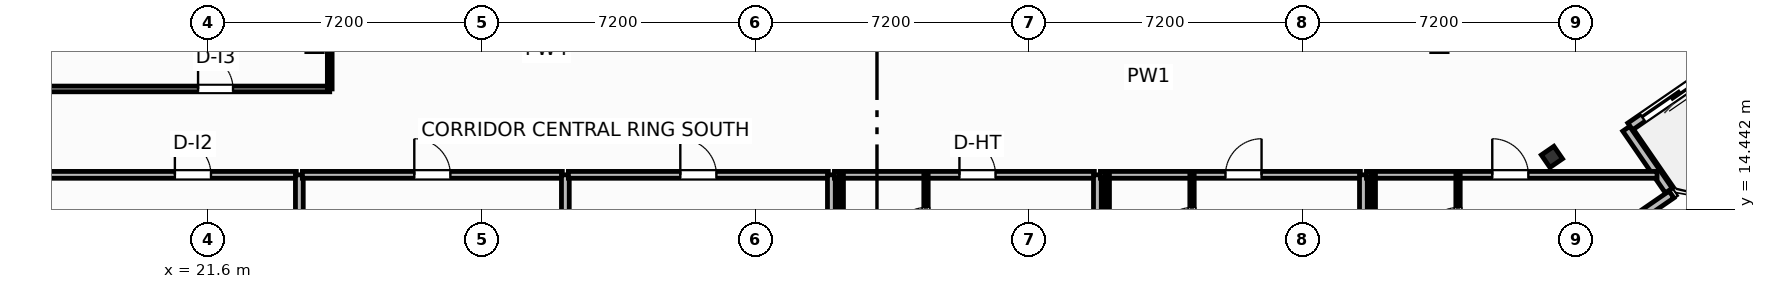
"""IFC4 building model, lengths in metres.
Left out: names, types, materials, properties, quantities, classifications, styles, units other than length and angle.
Written with IfcOpenShell. Run it as: python <this file> out.ifc"""

import sys

from ifc_helpers import new_model, si_unit, direction, frame, frame_2d, origin, origin_2d, place, context, subcontext, project, spatial, rectangle, i_section, extrude, element, fill, save


model = new_model("IFC4")
c1 = context("Model", 3, precision=1e-05, world=origin(), true_north=direction((0.0, 1.0)))
c2 = subcontext(c1, "Body", "Model", "MODEL_VIEW")
j1 = project(units=[si_unit("LENGTHUNIT", "METRE"), si_unit("PLANEANGLEUNIT", "RADIAN")], contexts=[c1])
p1 = place(None, origin())
s1 = spatial("IfcSite", under=j1, at=p1, CompositionType="ELEMENT")
p2 = place(p1, origin())
s2 = spatial("IfcBuilding", under=s1, at=p2, CompositionType="ELEMENT")
p3 = place(p2, frame((0.0, 0.0, 258.2)))
s3 = spatial("IfcBuildingStorey", under=s2, at=p3, CompositionType="ELEMENT", Elevation=258.2)
p4 = place(p3, frame((56.96, 15.823, 0.0), z_axis=(0.0, 0.0, 1.0), x_axis=(0.823532597628, 0.567268949127, 0.0)))
e1 = element("IfcColumn", 1, at=p4, inside=s3, PredefinedType="COLUMN", context=c2, shape_type="SweptSolid", body=[
    extrude(i_section(OverallWidth=0.401, OverallDepth=0.399, WebThickness=0.025, FlangeThickness=0.04, FilletRadius=0.022, at=origin_2d()), origin(), (0.0, 0.0, 1.0), 3.7),
])
p5 = place(p3, frame((63.605, 19.78, 0.0), z_axis=(0.0, 0.0, 1.0), x_axis=(-0.823541290762, -0.567256328665, 0.0)))
e2 = element("IfcWall", 2, at=p5, inside=s3, PredefinedType="SOLIDWALL", context=c2, shape_type="SweptSolid", body=[
    extrude(rectangle(XDim=5.567, YDim=0.22, at=frame_2d((2.784, 0.0))), origin(), (0.0, 0.0, 1.0), 2.73),
])
p6 = place(p5, frame((3.067, 0.0, 0.0)))
e3 = element("IfcOpeningElement", 3, at=p6, cuts=e2, PredefinedType="OPENING", context=c2, shape_type="SweptSolid", body=[
    extrude(rectangle(XDim=2.1, YDim=2.3, at=frame_2d((1.05, 1.15))), frame((0.0, 0.12, 0.0), z_axis=(0.0, -1.0, 0.0), x_axis=(1.0, 0.0, 0.0)), (0.0, 0.0, 1.0), 0.24),
])
p7 = place(p3, frame((53.49, 10.275, 0.0), z_axis=(0.0, 0.0, 1.0), x_axis=(0.823530942962, 0.56727135128, 0.0)))
e4 = element("IfcWall", 4, at=p7, inside=s3, PredefinedType="SOLIDWALL", context=c2, shape_type="SweptSolid", body=[
    extrude(rectangle(XDim=8.035, YDim=0.22, at=frame_2d((4.018, 0.0))), origin(), (0.0, 0.0, 1.0), 2.73),
])
p8 = place(p7, frame((2.968, 0.0, 0.8)))
e5 = element("IfcOpeningElement", 5, at=p8, cuts=e4, PredefinedType="OPENING", context=c2, shape_type="SweptSolid", body=[
    extrude(rectangle(XDim=2.1, YDim=1.75, at=frame_2d((1.05, 0.875))), frame((0.0, 0.12, 0.0), z_axis=(0.0, -1.0, 0.0), x_axis=(1.0, 0.0, 0.0)), (0.0, 0.0, 1.0), 0.24),
])
p9 = place(p3, frame((60.036, 14.936, 0.0), z_axis=(0.0, 0.0, 1.0), x_axis=(-0.567273565974, 0.823529417415, 0.0)))
e6 = element("IfcWall", 6, at=p9, inside=s3, PredefinedType="SOLIDWALL", context=c2, shape_type="SweptSolid", body=[
    extrude(rectangle(XDim=1.975, YDim=0.22, at=frame_2d((0.988, 0.0))), origin(), (0.0, 0.0, 1.0), 2.73),
])
p10 = place(p3, frame((5.0, 17.61, 0.0), z_axis=(0.0, 0.0, 1.0), x_axis=(1.0, 0.0, 0.0)))
e7 = element("IfcWall", 7, at=p10, inside=s3, PredefinedType="PARTITIONING", context=c2, shape_type="SweptSolid", body=[
    extrude(rectangle(XDim=19.8, YDim=0.15, at=frame_2d((9.9, 0.0))), origin(), (0.0, 0.0, 1.0), 2.739),
])
p11 = place(p10, frame((16.335, 0.0, 0.0)))
e8 = element("IfcOpeningElement", 8, at=p11, cuts=e7, PredefinedType="OPENING", context=c2, shape_type="SweptSolid", body=[
    extrude(rectangle(XDim=0.92, YDim=2.05, at=frame_2d((0.46, 1.025))), frame((0.0, 0.085, 0.0), z_axis=(0.0, -1.0, 0.0), x_axis=(1.0, 0.0, 0.0)), (0.0, 0.0, 1.0), 0.17),
])
p12 = place(p3, frame((24.8, 17.61, 0.0), z_axis=(0.0, 0.0, 1.0), x_axis=(0.0, 1.0, 0.0)))
e9 = element("IfcWall", 9, at=p12, inside=s3, PredefinedType="PARTITIONING", context=c2, shape_type="SweptSolid", body=[
    extrude(rectangle(XDim=1.63, YDim=0.125, at=frame_2d((0.815, 0.0))), origin(), (0.0, 0.0, 1.0), 3.45),
])
p13 = place(p3, frame((6.071, 15.35, 0.0), z_axis=(0.0, 0.0, 1.0), x_axis=(1.0, 0.0, 0.0)))
e10 = element("IfcWall", 10, at=p13, inside=s3, PredefinedType="PARTITIONING", context=c2, shape_type="SweptSolid", body=[
    extrude(rectangle(XDim=17.849, YDim=0.18, at=frame_2d((8.924, 0.0))), origin(), (0.0, 0.0, 1.0), 3.45),
])
p14 = place(p13, frame((14.654, 0.0, 0.0)))
e11 = element("IfcOpeningElement", 11, at=p14, cuts=e10, PredefinedType="OPENING", context=c2, shape_type="SweptSolid", body=[
    extrude(rectangle(XDim=0.95, YDim=2.05, at=frame_2d((0.475, 1.025))), frame((0.0, 0.1, 0.0), z_axis=(0.0, -1.0, 0.0), x_axis=(1.0, 0.0, 0.0)), (0.0, 0.0, 1.0), 0.2),
])
p15 = place(p3, frame((24.0, -4.0, 0.0), z_axis=(0.0, 0.0, 1.0), x_axis=(0.0, 1.0, 0.0)))
e12 = element("IfcWall", 12, at=p15, inside=s3, PredefinedType="PARTITIONING", context=c2, shape_type="SweptSolid", body=[
    extrude(rectangle(XDim=19.35, YDim=0.205, at=frame_2d((9.675, 0.0))), origin(), (0.0, 0.0, 1.0), 3.45),
])
p16 = place(p3, frame((24.08, 15.35, 0.0), z_axis=(0.0, 0.0, 1.0), x_axis=(1.0, 0.0, 0.0)))
e13 = element("IfcWall", 13, at=p16, inside=s3, PredefinedType="PARTITIONING", context=c2, shape_type="SweptSolid", body=[
    extrude(rectangle(XDim=6.84, YDim=0.18, at=frame_2d((3.42, 0.0))), origin(), (0.0, 0.0, 1.0), 3.45),
])
p17 = place(p16, frame((2.945, 0.0, 0.0)))
e14 = element("IfcOpeningElement", 14, at=p17, cuts=e13, PredefinedType="OPENING", context=c2, shape_type="SweptSolid", body=[
    extrude(rectangle(XDim=0.95, YDim=2.05, at=frame_2d((0.475, 1.025))), frame((0.0, 0.1, 0.0), z_axis=(0.0, -1.0, 0.0), x_axis=(1.0, 0.0, 0.0)), (0.0, 0.0, 1.0), 0.2),
])
p18 = place(p3, frame((31.0, -5.112, 0.0), z_axis=(0.0, 0.0, 1.0), x_axis=(0.0, 1.0, 0.0)))
e15 = element("IfcWall", 15, at=p18, inside=s3, PredefinedType="PARTITIONING", context=c2, shape_type="SweptSolid", body=[
    extrude(rectangle(XDim=20.462, YDim=0.205, at=frame_2d((10.231, 0.0))), origin(), (0.0, 0.0, 1.0), 3.45),
])
p19 = place(p3, frame((31.08, 15.35, 0.0), z_axis=(0.0, 0.0, 1.0), x_axis=(1.0, 0.0, 0.0)))
e16 = element("IfcWall", 16, at=p19, inside=s3, PredefinedType="PARTITIONING", context=c2, shape_type="SweptSolid", body=[
    extrude(rectangle(XDim=6.84, YDim=0.18, at=frame_2d((3.42, 0.0))), origin(), (0.0, 0.0, 1.0), 3.45),
])
p20 = place(p19, frame((2.945, 0.0, 0.0)))
e17 = element("IfcOpeningElement", 17, at=p20, cuts=e16, PredefinedType="OPENING", context=c2, shape_type="SweptSolid", body=[
    extrude(rectangle(XDim=0.95, YDim=2.05, at=frame_2d((0.475, 1.025))), frame((0.0, 0.1, 0.0), z_axis=(0.0, -1.0, 0.0), x_axis=(1.0, 0.0, 0.0)), (0.0, 0.0, 1.0), 0.2),
])
p21 = place(p3, frame((38.0, 2.179, 0.0), z_axis=(0.0, 0.0, 1.0), x_axis=(0.0, 1.0, 0.0)))
e18 = element("IfcWall", 18, at=p21, inside=s3, PredefinedType="PARTITIONING", context=c2, shape_type="SweptSolid", body=[
    extrude(rectangle(XDim=13.171, YDim=0.205, at=frame_2d((6.585, 0.0))), origin(), (0.0, 0.0, 1.0), 3.45),
])
p22 = place(p3, frame((38.08, 15.35, 0.0), z_axis=(0.0, 0.0, 1.0), x_axis=(1.0, 0.0, 0.0)))
e19 = element("IfcWall", 19, at=p22, inside=s3, PredefinedType="PARTITIONING", context=c2, shape_type="SweptSolid", body=[
    extrude(rectangle(XDim=6.84, YDim=0.18, at=frame_2d((3.42, 0.0))), origin(), (0.0, 0.0, 1.0), 3.45),
])
p23 = place(p22, frame((3.29, 0.0, 0.0)))
e20 = element("IfcOpeningElement", 20, at=p23, cuts=e19, PredefinedType="OPENING", context=c2, shape_type="SweptSolid", body=[
    extrude(rectangle(XDim=0.95, YDim=2.15, at=frame_2d((0.475, 1.075))), frame((0.0, 0.1, 0.0), z_axis=(0.0, -1.0, 0.0), x_axis=(1.0, 0.0, 0.0)), (0.0, 0.0, 1.0), 0.2),
])
p24 = place(p3, frame((40.49, 12.83, 0.0), z_axis=(0.0, 0.0, 1.0), x_axis=(0.0, 1.0, 0.0)))
e21 = element("IfcWall", 21, at=p24, inside=s3, PredefinedType="PARTITIONING", context=c2, shape_type="SweptSolid", body=[
    extrude(rectangle(XDim=2.52, YDim=0.115, at=frame_2d((1.26, 0.0))), origin(), (0.0, 0.0, 1.0), 3.45),
])
p25 = place(p24, frame((0.76, 0.0, 0.0)))
e22 = element("IfcOpeningElement", 22, at=p25, cuts=e21, PredefinedType="OPENING", context=c2, shape_type="SweptSolid", body=[
    extrude(rectangle(XDim=0.9, YDim=2.05, at=frame_2d((0.45, 1.025))), frame((0.0, 0.067, 0.0), z_axis=(0.0, -1.0, 0.0), x_axis=(1.0, 0.0, 0.0)), (0.0, 0.0, 1.0), 0.135),
])
p26 = place(p3, frame((38.26, 12.83, 0.0), z_axis=(0.0, 0.0, 1.0), x_axis=(0.0, 1.0, 0.0)))
e23 = element("IfcWall", 23, at=p26, inside=s3, PredefinedType="PARTITIONING", context=c2, shape_type="SweptSolid", body=[
    extrude(rectangle(XDim=2.52, YDim=0.115, at=frame_2d((1.26, 0.0))), origin(), (0.0, 0.0, 1.0), 3.45),
])
p27 = place(p3, frame((45.0, 4.451, 0.0), z_axis=(0.0, 0.0, 1.0), x_axis=(0.0, 1.0, 0.0)))
e24 = element("IfcWall", 24, at=p27, inside=s3, PredefinedType="PARTITIONING", context=c2, shape_type="SweptSolid", body=[
    extrude(rectangle(XDim=10.899, YDim=0.205, at=frame_2d((5.45, 0.0))), origin(), (0.0, 0.0, 1.0), 3.45),
])
p28 = place(p3, frame((45.08, 15.35, 0.0), z_axis=(0.0, 0.0, 1.0), x_axis=(1.0, 0.0, 0.0)))
e25 = element("IfcWall", 25, at=p28, inside=s3, PredefinedType="PARTITIONING", context=c2, shape_type="SweptSolid", body=[
    extrude(rectangle(XDim=6.84, YDim=0.18, at=frame_2d((3.42, 0.0))), origin(), (0.0, 0.0, 1.0), 3.45),
])
p29 = place(p28, frame((3.29, 0.0, 0.0)))
e26 = element("IfcOpeningElement", 26, at=p29, cuts=e25, PredefinedType="OPENING", context=c2, shape_type="SweptSolid", body=[
    extrude(rectangle(XDim=0.95, YDim=2.15, at=frame_2d((0.475, 1.075))), frame((0.0, 0.1, 0.0), z_axis=(0.0, -1.0, 0.0), x_axis=(1.0, 0.0, 0.0)), (0.0, 0.0, 1.0), 0.2),
])
p30 = place(p3, frame((47.49, 12.83, 0.0), z_axis=(0.0, 0.0, 1.0), x_axis=(0.0, 1.0, 0.0)))
e27 = element("IfcWall", 27, at=p30, inside=s3, PredefinedType="PARTITIONING", context=c2, shape_type="SweptSolid", body=[
    extrude(rectangle(XDim=2.52, YDim=0.115, at=frame_2d((1.26, 0.0))), origin(), (0.0, 0.0, 1.0), 3.45),
])
p31 = place(p30, frame((0.76, 0.0, 0.0)))
e28 = element("IfcOpeningElement", 28, at=p31, cuts=e27, PredefinedType="OPENING", context=c2, shape_type="SweptSolid", body=[
    extrude(rectangle(XDim=0.9, YDim=2.05, at=frame_2d((0.45, 1.025))), frame((0.0, 0.067, 0.0), z_axis=(0.0, -1.0, 0.0), x_axis=(1.0, 0.0, 0.0)), (0.0, 0.0, 1.0), 0.135),
])
p32 = place(p3, frame((45.26, 12.83, 0.0), z_axis=(0.0, 0.0, 1.0), x_axis=(0.0, 1.0, 0.0)))
e29 = element("IfcWall", 29, at=p32, inside=s3, PredefinedType="PARTITIONING", context=c2, shape_type="SweptSolid", body=[
    extrude(rectangle(XDim=2.52, YDim=0.115, at=frame_2d((1.26, 0.0))), origin(), (0.0, 0.0, 1.0), 3.45),
])
p33 = place(p3, frame((52.0, 11.823, 0.0), z_axis=(0.0, 0.0, 1.0), x_axis=(0.0, 1.0, 0.0)))
e30 = element("IfcWall", 30, at=p33, inside=s3, PredefinedType="PARTITIONING", context=c2, shape_type="SweptSolid", body=[
    extrude(rectangle(XDim=3.527, YDim=0.205, at=frame_2d((1.764, 0.0))), origin(), (0.0, 0.0, 1.0), 3.45),
])
p34 = place(p3, frame((52.08, 15.35, 0.0), z_axis=(0.0, 0.0, 1.0), x_axis=(1.0, 0.0, 0.0)))
e31 = element("IfcWall", 31, at=p34, inside=s3, PredefinedType="PARTITIONING", context=c2, shape_type="SweptSolid", body=[
    extrude(rectangle(XDim=7.646, YDim=0.18, at=frame_2d((3.823, 0.0))), origin(), (0.0, 0.0, 1.0), 3.45),
])
p35 = place(p34, frame((3.311, 0.0, 0.0)))
e32 = element("IfcOpeningElement", 32, at=p35, cuts=e31, PredefinedType="OPENING", context=c2, shape_type="SweptSolid", body=[
    extrude(rectangle(XDim=0.95, YDim=2.15, at=frame_2d((0.475, 1.075))), frame((0.0, 0.1, 0.0), z_axis=(0.0, -1.0, 0.0), x_axis=(1.0, 0.0, 0.0)), (0.0, 0.0, 1.0), 0.2),
])
p36 = place(p3, frame((54.49, 12.83, 0.0), z_axis=(0.0, 0.0, 1.0), x_axis=(0.0, 1.0, 0.0)))
e33 = element("IfcWall", 33, at=p36, inside=s3, PredefinedType="PARTITIONING", context=c2, shape_type="SweptSolid", body=[
    extrude(rectangle(XDim=2.52, YDim=0.115, at=frame_2d((1.26, 0.0))), origin(), (0.0, 0.0, 1.0), 3.45),
])
p37 = place(p36, frame((0.76, 0.0, 0.0)))
e34 = element("IfcOpeningElement", 34, at=p37, cuts=e33, PredefinedType="OPENING", context=c2, shape_type="SweptSolid", body=[
    extrude(rectangle(XDim=0.9, YDim=2.05, at=frame_2d((0.45, 1.025))), frame((0.0, 0.067, 0.0), z_axis=(0.0, -1.0, 0.0), x_axis=(1.0, 0.0, 0.0)), (0.0, 0.0, 1.0), 0.135),
])
p38 = place(p3, frame((52.26, 12.83, 0.0), z_axis=(0.0, 0.0, 1.0), x_axis=(0.0, 1.0, 0.0)))
e35 = element("IfcWall", 35, at=p38, inside=s3, PredefinedType="PARTITIONING", context=c2, shape_type="SweptSolid", body=[
    extrude(rectangle(XDim=2.52, YDim=0.115, at=frame_2d((1.26, 0.0))), origin(), (0.0, 0.0, 1.0), 3.45),
])
p39 = place(p6, origin())
e36 = element("IfcDoor", 36, at=p39, inside=s3, OperationType="SLIDING_TO_LEFT", PredefinedType="DOOR", context=c2, shape_type="SweptSolid", body=[
    extrude(rectangle(XDim=2.1, YDim=2.3, at=frame_2d((1.05, 1.15))), frame((0.0, 0.025, 0.0), z_axis=(0.0, -1.0, 0.0), x_axis=(1.0, 0.0, 0.0)), (0.0, 0.0, 1.0), 0.05),
])
fill(e3, e36)
p40 = place(p11, origin())
e37 = element("IfcDoor", 37, at=p40, inside=s3, OperationType="SINGLE_SWING_LEFT", PredefinedType="DOOR", context=c2, shape_type="SweptSolid", body=[
    extrude(rectangle(XDim=0.92, YDim=2.05, at=frame_2d((0.46, 1.025))), frame((0.0, 0.025, 0.0), z_axis=(0.0, -1.0, 0.0), x_axis=(1.0, 0.0, 0.0)), (0.0, 0.0, 1.0), 0.05),
])
fill(e8, e37)
p41 = place(p14, origin())
e38 = element("IfcDoor", 38, at=p41, inside=s3, OperationType="SINGLE_SWING_LEFT", PredefinedType="DOOR", context=c2, shape_type="SweptSolid", body=[
    extrude(rectangle(XDim=0.95, YDim=2.05, at=frame_2d((0.475, 1.025))), frame((0.0, 0.025, 0.0), z_axis=(0.0, -1.0, 0.0), x_axis=(1.0, 0.0, 0.0)), (0.0, 0.0, 1.0), 0.05),
])
fill(e11, e38)
p42 = place(p17, origin())
e39 = element("IfcDoor", 39, at=p42, inside=s3, OperationType="SINGLE_SWING_LEFT", PredefinedType="DOOR", context=c2, shape_type="SweptSolid", body=[
    extrude(rectangle(XDim=0.95, YDim=2.05, at=frame_2d((0.475, 1.025))), frame((0.0, 0.025, 0.0), z_axis=(0.0, -1.0, 0.0), x_axis=(1.0, 0.0, 0.0)), (0.0, 0.0, 1.0), 0.05),
])
fill(e14, e39)
p43 = place(p20, origin())
e40 = element("IfcDoor", 40, at=p43, inside=s3, OperationType="SINGLE_SWING_LEFT", PredefinedType="DOOR", context=c2, shape_type="SweptSolid", body=[
    extrude(rectangle(XDim=0.95, YDim=2.05, at=frame_2d((0.475, 1.025))), frame((0.0, 0.025, 0.0), z_axis=(0.0, -1.0, 0.0), x_axis=(1.0, 0.0, 0.0)), (0.0, 0.0, 1.0), 0.05),
])
fill(e17, e40)
p44 = place(p23, origin())
e41 = element("IfcDoor", 41, at=p44, inside=s3, OperationType="SINGLE_SWING_LEFT", PredefinedType="DOOR", context=c2, shape_type="SweptSolid", body=[
    extrude(rectangle(XDim=0.95, YDim=2.15, at=frame_2d((0.475, 1.075))), frame((0.0, 0.025, 0.0), z_axis=(0.0, -1.0, 0.0), x_axis=(1.0, 0.0, 0.0)), (0.0, 0.0, 1.0), 0.05),
])
fill(e20, e41)
p45 = place(p25, origin())
e42 = element("IfcDoor", 42, at=p45, inside=s3, OperationType="SINGLE_SWING_LEFT", PredefinedType="DOOR", context=c2, shape_type="SweptSolid", body=[
    extrude(rectangle(XDim=0.9, YDim=2.05, at=frame_2d((0.45, 1.025))), frame((0.0, 0.025, 0.0), z_axis=(0.0, -1.0, 0.0), x_axis=(1.0, 0.0, 0.0)), (0.0, 0.0, 1.0), 0.05),
])
fill(e22, e42)
p46 = place(p29, origin())
e43 = element("IfcDoor", 43, at=p46, inside=s3, OperationType="SINGLE_SWING_RIGHT", PredefinedType="DOOR", context=c2, shape_type="SweptSolid", body=[
    extrude(rectangle(XDim=0.95, YDim=2.15, at=frame_2d((0.475, 1.075))), frame((0.0, 0.025, 0.0), z_axis=(0.0, -1.0, 0.0), x_axis=(1.0, 0.0, 0.0)), (0.0, 0.0, 1.0), 0.05),
])
fill(e26, e43)
p47 = place(p31, origin())
e44 = element("IfcDoor", 44, at=p47, inside=s3, OperationType="SINGLE_SWING_LEFT", PredefinedType="DOOR", context=c2, shape_type="SweptSolid", body=[
    extrude(rectangle(XDim=0.9, YDim=2.05, at=frame_2d((0.45, 1.025))), frame((0.0, 0.025, 0.0), z_axis=(0.0, -1.0, 0.0), x_axis=(1.0, 0.0, 0.0)), (0.0, 0.0, 1.0), 0.05),
])
fill(e28, e44)
p48 = place(p35, origin())
e45 = element("IfcDoor", 45, at=p48, inside=s3, OperationType="SINGLE_SWING_LEFT", PredefinedType="DOOR", context=c2, shape_type="SweptSolid", body=[
    extrude(rectangle(XDim=0.95, YDim=2.15, at=frame_2d((0.475, 1.075))), frame((0.0, 0.025, 0.0), z_axis=(0.0, -1.0, 0.0), x_axis=(1.0, 0.0, 0.0)), (0.0, 0.0, 1.0), 0.05),
])
fill(e32, e45)
p49 = place(p37, origin())
e46 = element("IfcDoor", 46, at=p49, inside=s3, OperationType="SINGLE_SWING_LEFT", PredefinedType="DOOR", context=c2, shape_type="SweptSolid", body=[
    extrude(rectangle(XDim=0.9, YDim=2.05, at=frame_2d((0.45, 1.025))), frame((0.0, 0.025, 0.0), z_axis=(0.0, -1.0, 0.0), x_axis=(1.0, 0.0, 0.0)), (0.0, 0.0, 1.0), 0.05),
])
fill(e34, e46)
save(model, sys.argv[1])
